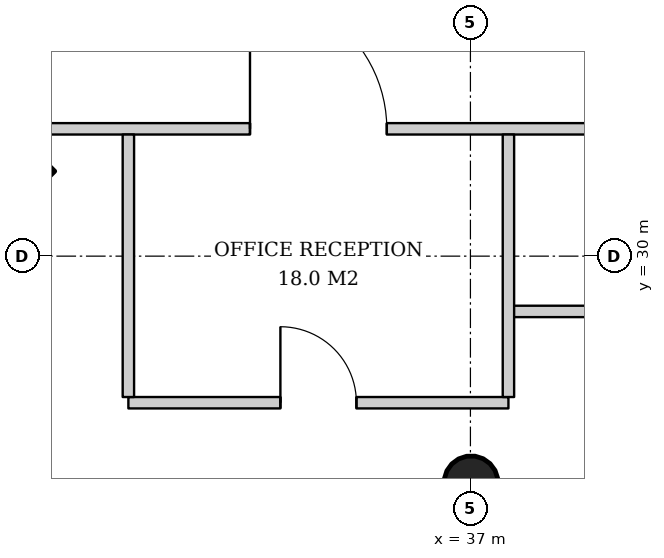
"""IFC4 building model, lengths in metres.
Left out: names, types, materials, properties, quantities, classifications, styles, units other than length and angle.
Written with IfcOpenShell. Run it as: python <this file> out.ifc"""

import sys

from ifc_helpers import new_model, si_unit, direction, frame, frame_2d, origin, origin_2d, place, context, subcontext, project, spatial, rectangle, hollow_circle, extrude, element, fill, save


model = new_model("IFC4")
c1 = context("Model", 3, precision=1e-05, world=origin(), true_north=direction((0.0, 1.0)))
c2 = subcontext(c1, "Body", "Model", "MODEL_VIEW")
j1 = project(units=[si_unit("LENGTHUNIT", "METRE"), si_unit("PLANEANGLEUNIT", "RADIAN")], contexts=[c1])
p1 = place(None, origin())
s1 = spatial("IfcSite", under=j1, at=p1, CompositionType="ELEMENT")
p2 = place(p1, origin())
s2 = spatial("IfcBuilding", under=s1, at=p2, CompositionType="ELEMENT")
p3 = place(p2, frame((0.0, 0.0, 176.8)))
s3 = spatial("IfcBuildingStorey", under=s2, at=p3, CompositionType="ELEMENT", Elevation=176.8)
p4 = place(p3, frame((30.079, 31.079, 0.0), z_axis=(0.031898107953, 0.031898107953, 0.998981992539), x_axis=(-0.707106781187, 0.707106781187, 0.0)))
e1 = element("IfcColumn", 1, at=p4, inside=s3, PredefinedType="COLUMN", context=c2, shape_type="SweptSolid", body=[
    extrude(rectangle(XDim=2.0, YDim=2.0, at=origin_2d()), origin(), (0.0, 0.0, 1.0), 3.804),
])
p5 = place(p3, frame((36.989, 26.979, 0.0), z_axis=(0.015987204877, 0.031974409754, 0.999360818924), x_axis=(-0.894427191, 0.4472135955, 0.0)))
e2 = element("IfcColumn", 2, at=p5, inside=s3, PredefinedType="COLUMN", context=c2, shape_type="SweptSolid", body=[
    extrude(hollow_circle(Radius=0.355, WallThickness=0.025, at=origin_2d()), origin(), (0.0, 0.0, 1.0), 3.802),
])
p6 = place(p3, frame((31.214, 31.675, 0.0), z_axis=(0.0, 0.0, 1.0), x_axis=(1.0, 0.0, 0.0)))
e3 = element("IfcWall", 3, at=p6, inside=s3, PredefinedType="PARTITIONING", context=c2, shape_type="SweptSolid", body=[
    extrude(rectangle(XDim=27.572, YDim=0.15, at=frame_2d((13.786, 0.0))), origin(), (0.0, 0.0, 1.0), 2.867),
])
p7 = place(p6, frame((2.886, 0.0, 0.0)))
e4 = element("IfcOpeningElement", 4, at=p7, cuts=e3, PredefinedType="OPENING", context=c2, shape_type="SweptSolid", body=[
    extrude(rectangle(XDim=1.8, YDim=2.4, at=frame_2d((0.9, 1.2))), frame((0.0, 0.085, 0.0), z_axis=(0.0, -1.0, 0.0), x_axis=(1.0, 0.0, 0.0)), (0.0, 0.0, 1.0), 0.17),
])
p8 = place(p3, frame((32.5, 28.072, 0.0), z_axis=(0.0, 0.0, 1.0), x_axis=(1.0, 0.0, 0.0)))
e5 = element("IfcWall", 5, at=p8, inside=s3, PredefinedType="PARTITIONING", context=c2, shape_type="SweptSolid", body=[
    extrude(rectangle(XDim=5.0, YDim=0.15, at=frame_2d((2.5, 0.0))), origin(), (0.0, 0.0, 1.0), 2.92),
])
p9 = place(p8, frame((2.0, 0.0, 0.0)))
e6 = element("IfcOpeningElement", 6, at=p9, cuts=e5, PredefinedType="OPENING", context=c2, shape_type="SweptSolid", body=[
    extrude(rectangle(XDim=1.0, YDim=2.1, at=frame_2d((0.5, 1.05))), frame((0.0, 0.085, 0.0), z_axis=(0.0, -1.0, 0.0), x_axis=(1.0, 0.0, 0.0)), (0.0, 0.0, 1.0), 0.17),
])
p10 = place(p3, frame((37.5, 29.273, 0.0), z_axis=(0.0, 0.0, 1.0), x_axis=(1.0, 0.0, 0.0)))
e7 = element("IfcWall", 7, at=p10, inside=s3, PredefinedType="PARTITIONING", context=c2, shape_type="SweptSolid", body=[
    extrude(rectangle(XDim=5.0, YDim=0.15, at=frame_2d((2.5, 0.0))), origin(), (0.0, 0.0, 1.0), 2.867),
])
p11 = place(p10, frame((2.0, 0.0, 0.0)))
e8 = element("IfcOpeningElement", 8, at=p11, cuts=e7, PredefinedType="OPENING", context=c2, shape_type="SweptSolid", body=[
    extrude(rectangle(XDim=1.0, YDim=2.1, at=frame_2d((0.5, 1.05))), frame((0.0, 0.085, 0.0), z_axis=(0.0, -1.0, 0.0), x_axis=(1.0, 0.0, 0.0)), (0.0, 0.0, 1.0), 0.17),
])
p12 = place(p3, frame((32.5, 31.6, 0.0), z_axis=(0.0, 0.0, 1.0), x_axis=(0.0, -1.0, 0.0)))
e9 = element("IfcWall", 9, at=p12, inside=s3, PredefinedType="PARTITIONING", context=c2, shape_type="SweptSolid", body=[
    extrude(rectangle(XDim=3.454, YDim=0.15, at=frame_2d((1.727, 0.0))), origin(), (0.0, 0.0, 1.0), 3.22),
])
p13 = place(p3, frame((37.5, 31.6, 0.0), z_axis=(0.0, 0.0, 1.0), x_axis=(0.0, -1.0, 0.0)))
e10 = element("IfcWall", 10, at=p13, inside=s3, PredefinedType="PARTITIONING", context=c2, shape_type="SweptSolid", body=[
    extrude(rectangle(XDim=3.454, YDim=0.15, at=frame_2d((1.727, 0.0))), origin(), (0.0, 0.0, 1.0), 3.62),
])
p14 = place(p7, origin())
e11 = element("IfcDoor", 11, at=p14, inside=s3, OperationType="DOUBLE_DOOR_SINGLE_SWING", PredefinedType="DOOR", context=c2, shape_type="SweptSolid", body=[
    extrude(rectangle(XDim=1.8, YDim=2.4, at=frame_2d((0.9, 1.2))), frame((0.0, 0.025, 0.0), z_axis=(0.0, -1.0, 0.0), x_axis=(1.0, 0.0, 0.0)), (0.0, 0.0, 1.0), 0.05),
])
fill(e4, e11)
p15 = place(p9, origin())
e12 = element("IfcDoor", 12, at=p15, inside=s3, OperationType="SINGLE_SWING_LEFT", PredefinedType="DOOR", context=c2, shape_type="SweptSolid", body=[
    extrude(rectangle(XDim=1.0, YDim=2.1, at=frame_2d((0.5, 1.05))), frame((0.0, 0.025, 0.0), z_axis=(0.0, -1.0, 0.0), x_axis=(1.0, 0.0, 0.0)), (0.0, 0.0, 1.0), 0.05),
])
fill(e6, e12)
save(model, sys.argv[1])
